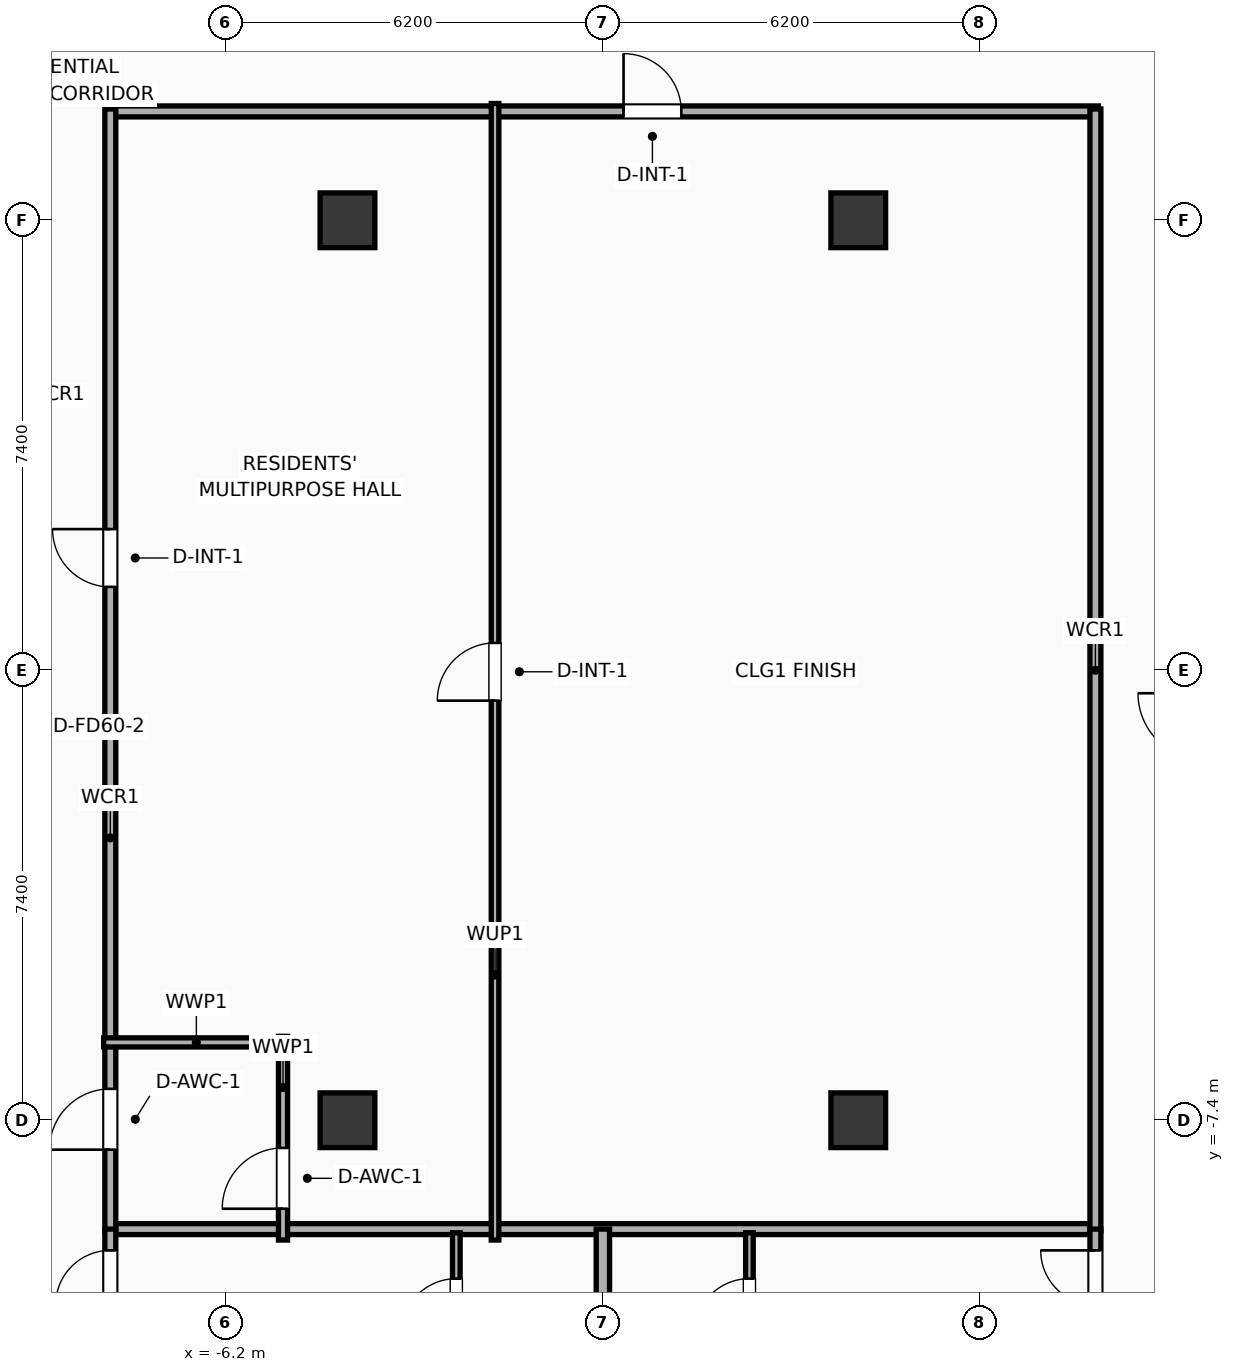
"""IFC4 building model, lengths in metres.
Left out: names, types, materials, properties, quantities, classifications, styles, units other than length and angle.
Written with IfcOpenShell. Run it as: python <this file> out.ifc"""

import sys

from ifc_helpers import new_model, si_unit, direction, frame, frame_2d, origin, origin_2d, place, context, subcontext, project, spatial, rectangle, extrude, element, fill, save


model = new_model("IFC4")
c1 = context("Model", 3, precision=1e-05, world=origin(), true_north=direction((0.0, 1.0)))
c2 = subcontext(c1, "Body", "Model", "MODEL_VIEW")
j1 = project(units=[si_unit("LENGTHUNIT", "METRE"), si_unit("PLANEANGLEUNIT", "RADIAN")], contexts=[c1])
p1 = place(None, origin())
s1 = spatial("IfcSite", under=j1, at=p1, CompositionType="ELEMENT")
p2 = place(p1, origin())
s2 = spatial("IfcBuilding", under=s1, at=p2, CompositionType="ELEMENT")
p3 = place(p2, frame((0.0, 0.0, 219.7)))
s3 = spatial("IfcBuildingStorey", under=s2, at=p3, CompositionType="ELEMENT", Elevation=219.7)
for number, where, z_axis, x_axis in (
    (1, (-4.2, -7.4, 0.0), (0.0, 0.0, 1.0), (1.0, 0.0, 0.0)),
    (2, (-4.2, 7.4, 0.0), (0.0, 0.0, 1.0), (1.0, 0.0, 0.0)),
    (3, (4.2, -7.4, 0.0), (0.0, 0.0, 1.0), (1.0, 0.0, 0.0)),
    (4, (4.2, 7.4, 0.0), (0.0, 0.0, 1.0), (1.0, 0.0, 0.0)),
):
    element("IfcColumn", number, at=place(p3, frame(where, z_axis=z_axis, x_axis=x_axis)), inside=s3, PredefinedType="COLUMN", context=c2, shape_type="SweptSolid", body=[
        extrude(rectangle(XDim=0.9, YDim=0.9, at=origin_2d()), origin(), (0.0, 0.0, 1.0), 3.9),
    ])
p4 = place(p3, frame((-8.15, 9.19, 0.0), z_axis=(0.0, 0.0, 1.0), x_axis=(1.0, 0.0, 0.0)))
e5 = element("IfcWall", 5, at=p4, inside=s3, PredefinedType="PARTITIONING", context=c2, shape_type="SweptSolid", body=[
    extrude(rectangle(XDim=16.3, YDim=0.18, at=frame_2d((8.15, 0.0))), origin(), (0.0, 0.0, 1.0), 3.65),
])
p5 = place(p4, frame((8.49, 0.0, 0.0)))
e6 = element("IfcOpeningElement", 6, at=p5, cuts=e5, PredefinedType="OPENING", context=c2, shape_type="SweptSolid", body=[
    extrude(rectangle(XDim=0.95, YDim=2.05, at=frame_2d((0.475, 1.025))), frame((0.0, 0.1, 0.0), z_axis=(0.0, -1.0, 0.0), x_axis=(1.0, 0.0, 0.0)), (0.0, 0.0, 1.0), 0.2),
])
p6 = place(p3, frame((-8.15, -9.19, 0.0), z_axis=(0.0, 0.0, 1.0), x_axis=(1.0, 0.0, 0.0)))
e7 = element("IfcWall", 7, at=p6, inside=s3, PredefinedType="PARTITIONING", context=c2, shape_type="SweptSolid", body=[
    extrude(rectangle(XDim=16.3, YDim=0.18, at=frame_2d((8.15, 0.0))), origin(), (0.0, 0.0, 1.0), 3.65),
])
p7 = place(p3, frame((-8.1, -9.23, 0.0), z_axis=(0.0, 0.0, 1.0), x_axis=(0.0, 1.0, 0.0)))
e8 = element("IfcWall", 8, at=p7, inside=s3, PredefinedType="PARTITIONING", context=c2, shape_type="SweptSolid", body=[
    extrude(rectangle(XDim=18.46, YDim=0.18, at=frame_2d((9.23, 0.0))), origin(), (0.0, 0.0, 1.0), 3.65),
])
p8 = place(p7, frame((1.346, 0.0, 0.0)))
e9 = element("IfcOpeningElement", 9, at=p8, cuts=e8, PredefinedType="OPENING", context=c2, shape_type="SweptSolid", body=[
    extrude(rectangle(XDim=1.0, YDim=2.05, at=frame_2d((0.5, 1.025))), frame((0.0, 0.1, 0.0), z_axis=(0.0, -1.0, 0.0), x_axis=(1.0, 0.0, 0.0)), (0.0, 0.0, 1.0), 0.2),
])
p9 = place(p7, frame((10.601, 0.0, 0.0)))
e10 = element("IfcOpeningElement", 10, at=p9, cuts=e8, PredefinedType="OPENING", context=c2, shape_type="SweptSolid", body=[
    extrude(rectangle(XDim=0.95, YDim=2.05, at=frame_2d((0.475, 1.025))), frame((0.0, 0.1, 0.0), z_axis=(0.0, -1.0, 0.0), x_axis=(1.0, 0.0, 0.0)), (0.0, 0.0, 1.0), 0.2),
])
p10 = place(p3, frame((8.1, -9.23, 0.0), z_axis=(0.0, 0.0, 1.0), x_axis=(0.0, 1.0, 0.0)))
e11 = element("IfcWall", 11, at=p10, inside=s3, PredefinedType="PARTITIONING", context=c2, shape_type="SweptSolid", body=[
    extrude(rectangle(XDim=18.46, YDim=0.18, at=frame_2d((9.23, 0.0))), origin(), (0.0, 0.0, 1.0), 3.65),
])
p11 = place(p3, frame((-5.26, -9.37, 0.0), z_axis=(0.0, 0.0, 1.0), x_axis=(0.0, 1.0, 0.0)))
e12 = element("IfcWall", 12, at=p11, inside=s3, PredefinedType="PLUMBINGWALL", context=c2, shape_type="SweptSolid", body=[
    extrude(rectangle(XDim=3.35, YDim=0.15, at=frame_2d((1.675, 0.0))), origin(), (0.0, 0.0, 1.0), 3.65),
])
p12 = place(p11, frame((0.515, 0.0, 0.0)))
e13 = element("IfcOpeningElement", 13, at=p12, cuts=e12, PredefinedType="OPENING", context=c2, shape_type="SweptSolid", body=[
    extrude(rectangle(XDim=1.0, YDim=2.05, at=frame_2d((0.5, 1.025))), frame((0.0, 0.085, 0.0), z_axis=(0.0, -1.0, 0.0), x_axis=(1.0, 0.0, 0.0)), (0.0, 0.0, 1.0), 0.17),
])
p13 = place(p3, frame((-8.21, -6.12, 0.0), z_axis=(0.0, 0.0, 1.0), x_axis=(1.0, 0.0, 0.0)))
e14 = element("IfcWall", 14, at=p13, inside=s3, PredefinedType="PLUMBINGWALL", context=c2, shape_type="SweptSolid", body=[
    extrude(rectangle(XDim=3.05, YDim=0.15, at=frame_2d((1.525, 0.0))), origin(), (0.0, 0.0, 1.0), 3.65),
])
p14 = place(p3, frame((-1.773, -9.37, 0.0), z_axis=(0.0, 0.0, 1.0), x_axis=(0.0, 1.0, 0.0)))
e15 = element("IfcWall", 15, at=p14, inside=s3, PredefinedType="PARTITIONING", context=c2, shape_type="SweptSolid", body=[
    extrude(rectangle(XDim=18.69, YDim=0.125, at=frame_2d((9.345, 0.0))), origin(), (0.0, 0.0, 1.0), 3.65),
])
p15 = place(p14, frame((8.87, 0.0, 0.0)))
e16 = element("IfcOpeningElement", 16, at=p15, cuts=e15, PredefinedType="OPENING", context=c2, shape_type="SweptSolid", body=[
    extrude(rectangle(XDim=0.95, YDim=2.05, at=frame_2d((0.475, 1.025))), frame((0.0, 0.073, 0.0), z_axis=(0.0, -1.0, 0.0), x_axis=(1.0, 0.0, 0.0)), (0.0, 0.0, 1.0), 0.145),
])
p16 = place(p3, frame((-2.41, -11.66, 0.0), z_axis=(0.0, 0.0, 1.0), x_axis=(0.0, 1.0, 0.0)))
e17 = element("IfcWall", 17, at=p16, inside=s3, PredefinedType="PARTITIONING", context=c2, shape_type="SweptSolid", body=[
    extrude(rectangle(XDim=2.41, YDim=0.125, at=frame_2d((1.205, 0.0))), origin(), (0.0, 0.0, 1.0), 3.65),
])
p17 = place(p16, frame((0.755, 0.0, 0.0)))
e18 = element("IfcOpeningElement", 18, at=p17, cuts=e17, PredefinedType="OPENING", context=c2, shape_type="SweptSolid", body=[
    extrude(rectangle(XDim=0.9, YDim=2.05, at=frame_2d((0.45, 1.025))), frame((0.0, 0.073, 0.0), z_axis=(0.0, -1.0, 0.0), x_axis=(1.0, 0.0, 0.0)), (0.0, 0.0, 1.0), 0.145),
])
p18 = place(p3, frame((-8.1, -18.83, 0.0), z_axis=(0.0, 0.0, 1.0), x_axis=(0.0, 1.0, 0.0)))
e19 = element("IfcWall", 19, at=p18, inside=s3, PredefinedType="PARTITIONING", context=c2, shape_type="SweptSolid", body=[
    extrude(rectangle(XDim=9.64, YDim=0.18, at=frame_2d((4.82, 0.0))), origin(), (0.0, 0.0, 1.0), 3.65),
])
p19 = place(p18, frame((8.39, 0.0, 0.0)))
e20 = element("IfcOpeningElement", 20, at=p19, cuts=e19, PredefinedType="OPENING", context=c2, shape_type="SweptSolid", body=[
    extrude(rectangle(XDim=0.9, YDim=2.05, at=frame_2d((0.45, 1.025))), frame((0.0, 0.1, 0.0), z_axis=(0.0, -1.0, 0.0), x_axis=(1.0, 0.0, 0.0)), (0.0, 0.0, 1.0), 0.2),
])
p20 = place(p3, frame((2.41, -11.66, 0.0), z_axis=(0.0, 0.0, 1.0), x_axis=(0.0, 1.0, 0.0)))
e21 = element("IfcWall", 21, at=p20, inside=s3, PredefinedType="PARTITIONING", context=c2, shape_type="SweptSolid", body=[
    extrude(rectangle(XDim=2.41, YDim=0.125, at=frame_2d((1.205, 0.0))), origin(), (0.0, 0.0, 1.0), 3.65),
])
p21 = place(p20, frame((0.755, 0.0, 0.0)))
e22 = element("IfcOpeningElement", 22, at=p21, cuts=e21, PredefinedType="OPENING", context=c2, shape_type="SweptSolid", body=[
    extrude(rectangle(XDim=0.9, YDim=2.05, at=frame_2d((0.45, 1.025))), frame((0.0, 0.073, 0.0), z_axis=(0.0, -1.0, 0.0), x_axis=(1.0, 0.0, 0.0)), (0.0, 0.0, 1.0), 0.145),
])
p22 = place(p3, frame((8.1, -18.83, 0.0), z_axis=(0.0, 0.0, 1.0), x_axis=(0.0, 1.0, 0.0)))
e23 = element("IfcWall", 23, at=p22, inside=s3, PredefinedType="PARTITIONING", context=c2, shape_type="SweptSolid", body=[
    extrude(rectangle(XDim=9.64, YDim=0.18, at=frame_2d((4.82, 0.0))), origin(), (0.0, 0.0, 1.0), 3.65),
])
p23 = place(p22, frame((8.39, 0.0, 0.0)))
e24 = element("IfcOpeningElement", 24, at=p23, cuts=e23, PredefinedType="OPENING", context=c2, shape_type="SweptSolid", body=[
    extrude(rectangle(XDim=0.9, YDim=2.05, at=frame_2d((0.45, 1.025))), frame((0.0, 0.1, 0.0), z_axis=(0.0, -1.0, 0.0), x_axis=(1.0, 0.0, 0.0)), (0.0, 0.0, 1.0), 0.2),
])
p24 = place(p3, frame((0.0, -18.83, 0.0), z_axis=(0.0, 0.0, 1.0), x_axis=(0.0, 1.0, 0.0)))
e25 = element("IfcWall", 25, at=p24, inside=s3, PredefinedType="PARTITIONING", context=c2, shape_type="SweptSolid", body=[
    extrude(rectangle(XDim=9.64, YDim=0.22, at=frame_2d((4.82, 0.0))), origin(), (0.0, 0.0, 1.0), 3.65),
])
p25 = place(p5, origin())
e26 = element("IfcDoor", 26, at=p25, inside=s3, OperationType="SINGLE_SWING_LEFT", PredefinedType="DOOR", context=c2, shape_type="SweptSolid", body=[
    extrude(rectangle(XDim=0.95, YDim=2.05, at=frame_2d((0.475, 1.025))), frame((0.0, 0.025, 0.0), z_axis=(0.0, -1.0, 0.0), x_axis=(1.0, 0.0, 0.0)), (0.0, 0.0, 1.0), 0.05),
])
fill(e6, e26)
p26 = place(p8, origin())
e27 = element("IfcDoor", 27, at=p26, inside=s3, OperationType="SINGLE_SWING_LEFT", PredefinedType="DOOR", context=c2, shape_type="SweptSolid", body=[
    extrude(rectangle(XDim=1.0, YDim=2.05, at=frame_2d((0.5, 1.025))), frame((0.0, 0.025, 0.0), z_axis=(0.0, -1.0, 0.0), x_axis=(1.0, 0.0, 0.0)), (0.0, 0.0, 1.0), 0.05),
])
fill(e9, e27)
p27 = place(p9, origin())
e28 = element("IfcDoor", 28, at=p27, inside=s3, OperationType="SINGLE_SWING_RIGHT", PredefinedType="DOOR", context=c2, shape_type="SweptSolid", body=[
    extrude(rectangle(XDim=0.95, YDim=2.05, at=frame_2d((0.475, 1.025))), frame((0.0, 0.025, 0.0), z_axis=(0.0, -1.0, 0.0), x_axis=(1.0, 0.0, 0.0)), (0.0, 0.0, 1.0), 0.05),
])
fill(e10, e28)
p28 = place(p12, origin())
e29 = element("IfcDoor", 29, at=p28, inside=s3, OperationType="SINGLE_SWING_LEFT", PredefinedType="DOOR", context=c2, shape_type="SweptSolid", body=[
    extrude(rectangle(XDim=1.0, YDim=2.05, at=frame_2d((0.5, 1.025))), frame((0.0, 0.025, 0.0), z_axis=(0.0, -1.0, 0.0), x_axis=(1.0, 0.0, 0.0)), (0.0, 0.0, 1.0), 0.05),
])
fill(e13, e29)
p29 = place(p15, origin())
e30 = element("IfcDoor", 30, at=p29, inside=s3, OperationType="SINGLE_SWING_LEFT", PredefinedType="DOOR", context=c2, shape_type="SweptSolid", body=[
    extrude(rectangle(XDim=0.95, YDim=2.05, at=frame_2d((0.475, 1.025))), frame((0.0, 0.025, 0.0), z_axis=(0.0, -1.0, 0.0), x_axis=(1.0, 0.0, 0.0)), (0.0, 0.0, 1.0), 0.05),
])
fill(e16, e30)
p30 = place(p17, origin())
e31 = element("IfcDoor", 31, at=p30, inside=s3, OperationType="SINGLE_SWING_LEFT", PredefinedType="DOOR", context=c2, shape_type="SweptSolid", body=[
    extrude(rectangle(XDim=0.9, YDim=2.05, at=frame_2d((0.45, 1.025))), frame((0.0, 0.025, 0.0), z_axis=(0.0, -1.0, 0.0), x_axis=(1.0, 0.0, 0.0)), (0.0, 0.0, 1.0), 0.05),
])
fill(e18, e31)
p31 = place(p19, origin())
e32 = element("IfcDoor", 32, at=p31, inside=s3, OperationType="SINGLE_SWING_LEFT", PredefinedType="DOOR", context=c2, shape_type="SweptSolid", body=[
    extrude(rectangle(XDim=0.9, YDim=2.05, at=frame_2d((0.45, 1.025))), frame((0.0, 0.025, 0.0), z_axis=(0.0, -1.0, 0.0), x_axis=(1.0, 0.0, 0.0)), (0.0, 0.0, 1.0), 0.05),
])
fill(e20, e32)
p32 = place(p21, origin())
e33 = element("IfcDoor", 33, at=p32, inside=s3, OperationType="SINGLE_SWING_LEFT", PredefinedType="DOOR", context=c2, shape_type="SweptSolid", body=[
    extrude(rectangle(XDim=0.9, YDim=2.05, at=frame_2d((0.45, 1.025))), frame((0.0, 0.025, 0.0), z_axis=(0.0, -1.0, 0.0), x_axis=(1.0, 0.0, 0.0)), (0.0, 0.0, 1.0), 0.05),
])
fill(e22, e33)
p33 = place(p23, origin())
e34 = element("IfcDoor", 34, at=p33, inside=s3, OperationType="SINGLE_SWING_RIGHT", PredefinedType="DOOR", context=c2, shape_type="SweptSolid", body=[
    extrude(rectangle(XDim=0.9, YDim=2.05, at=frame_2d((0.45, 1.025))), frame((0.0, 0.025, 0.0), z_axis=(0.0, -1.0, 0.0), x_axis=(1.0, 0.0, 0.0)), (0.0, 0.0, 1.0), 0.05),
])
fill(e24, e34)
save(model, sys.argv[1])
